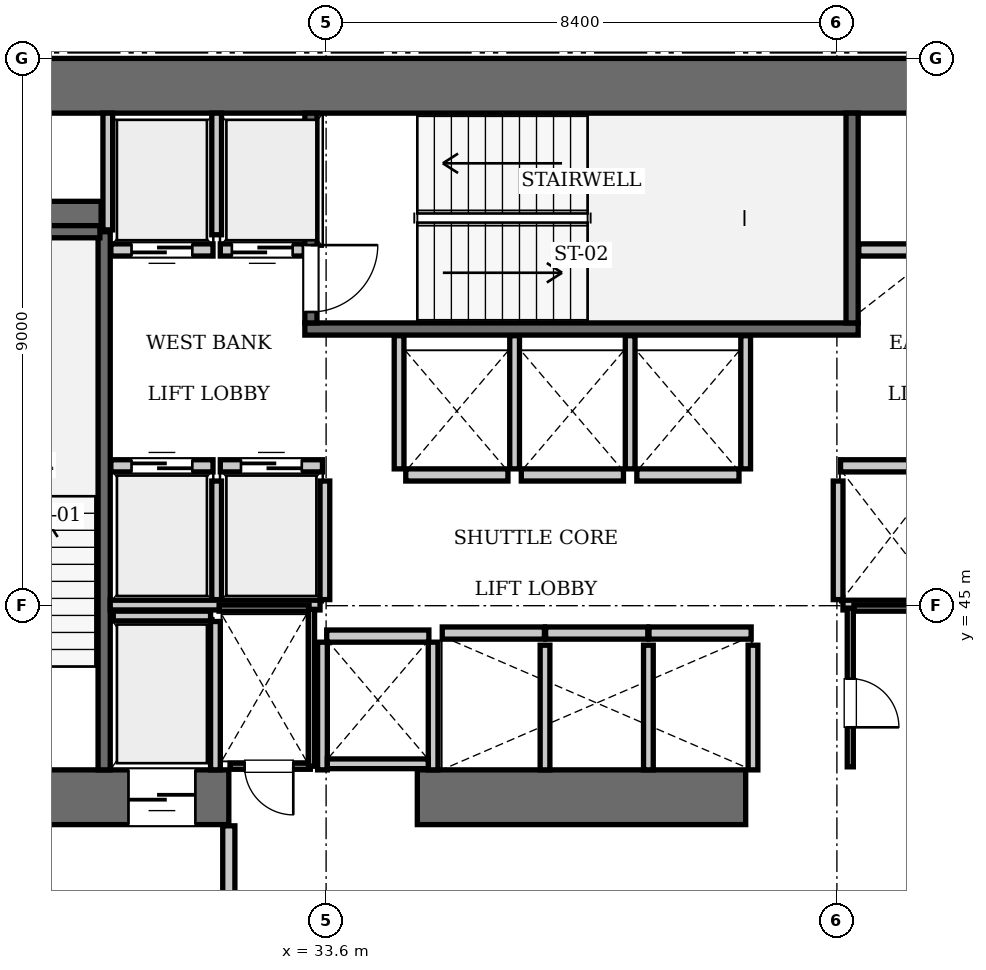
"""IFC4 building model, lengths in metres.
Left out: names, types, materials, properties, quantities, classifications, styles, units other than length and angle.
Written with IfcOpenShell. Run it as: python <this file> out.ifc"""

import sys

from ifc_helpers import new_model, si_unit, direction, frame, frame_2d, origin, place, context, subcontext, project, spatial, rectangle, extrude, element, fill, save


model = new_model("IFC4")
c1 = context("Model", 3, precision=1e-05, world=origin(), true_north=direction((0.0, 1.0)))
c2 = subcontext(c1, "Body", "Model", "MODEL_VIEW")
j1 = project(units=[si_unit("LENGTHUNIT", "METRE"), si_unit("PLANEANGLEUNIT", "RADIAN")], contexts=[c1])
p1 = place(None, origin())
s1 = spatial("IfcSite", under=j1, at=p1, CompositionType="ELEMENT")
p2 = place(p1, origin())
s2 = spatial("IfcBuilding", under=s1, at=p2, CompositionType="ELEMENT")
p3 = place(p2, frame((0.0, 0.0, 46.2)))
s3 = spatial("IfcBuildingStorey", under=s2, at=p3, CompositionType="ELEMENT", Elevation=46.2)
p4 = place(p3, frame((25.2, 53.55, 0.0), z_axis=(0.0, 0.0, 1.0), x_axis=(1.0, 0.0, 0.0)))
e1 = element("IfcWall", 1, at=p4, inside=s3, PredefinedType="SHEAR", context=c2, shape_type="SweptSolid", body=[
    extrude(rectangle(XDim=25.2, YDim=0.9, at=frame_2d((12.6, 0.0))), origin(), (0.0, 0.0, 1.0), 3.85),
])
p5 = place(p3, frame((25.2, 41.85, 0.0), z_axis=(0.0, 0.0, 1.0), x_axis=(1.0, 0.0, 0.0)))
e2 = element("IfcWall", 2, at=p5, inside=s3, PredefinedType="SHEAR", context=c2, shape_type="SweptSolid", body=[
    extrude(rectangle(XDim=6.8, YDim=0.9, at=frame_2d((3.4, 0.0))), origin(), (0.0, 0.0, 1.0), 3.85),
])
p6 = place(p5, frame((1.65, 0.0, 0.0)))
e3 = element("IfcOpeningElement", 3, at=p6, cuts=e2, PredefinedType="OPENING", context=c2, shape_type="SweptSolid", body=[
    extrude(rectangle(XDim=1.15, YDim=2.15, at=frame_2d((0.575, 1.075))), frame((0.0, 0.46, 0.0), z_axis=(0.0, -1.0, 0.0), x_axis=(1.0, 0.0, 0.0)), (0.0, 0.0, 1.0), 0.92),
])
p7 = place(p5, frame((5.15, 0.0, 0.0)))
e4 = element("IfcOpeningElement", 4, at=p7, cuts=e2, PredefinedType="OPENING", context=c2, shape_type="SweptSolid", body=[
    extrude(rectangle(XDim=1.1, YDim=2.2, at=frame_2d((0.55, 1.1))), frame((0.0, 0.46, 0.0), z_axis=(0.0, -1.0, 0.0), x_axis=(1.0, 0.0, 0.0)), (0.0, 0.0, 1.0), 0.92),
])
p8 = place(p3, frame((35.1, 41.85, 0.0), z_axis=(0.0, 0.0, 1.0), x_axis=(1.0, 0.0, 0.0)))
e5 = element("IfcWall", 5, at=p8, inside=s3, PredefinedType="SHEAR", context=c2, shape_type="SweptSolid", body=[
    extrude(rectangle(XDim=5.4, YDim=0.9, at=frame_2d((2.7, 0.0))), origin(), (0.0, 0.0, 1.0), 3.85),
])
p9 = place(p3, frame((26.1, 51.4, 0.0), z_axis=(0.0, 0.0, 1.0), x_axis=(1.0, 0.0, 0.0)))
e6 = element("IfcWall", 6, at=p9, inside=s3, PredefinedType="SHEAR", context=c2, shape_type="SweptSolid", body=[
    extrude(rectangle(XDim=3.8, YDim=0.5, at=frame_2d((1.9, 0.0))), origin(), (0.0, 0.0, 1.0), 3.85),
])
p10 = place(p3, frame((29.95, 42.3, 0.0), z_axis=(0.0, 0.0, 1.0), x_axis=(0.0, 1.0, 0.0)))
e7 = element("IfcWall", 7, at=p10, inside=s3, PredefinedType="SOLIDWALL", context=c2, shape_type="SweptSolid", body=[
    extrude(rectangle(XDim=8.85, YDim=0.2, at=frame_2d((4.425, 0.0))), origin(), (0.0, 0.0, 1.0), 3.61),
])
p11 = place(p3, frame((26.38, 51.15, 0.0), z_axis=(0.0, 0.0, 1.0), x_axis=(1.0, 0.0, 0.0)))
e8 = element("IfcWall", 8, at=p11, inside=s3, PredefinedType="SOLIDWALL", context=c2, shape_type="SweptSolid", body=[
    extrude(rectangle(XDim=3.5, YDim=0.2, at=frame_2d((1.75, 0.0))), origin(), (0.0, 0.0, 1.0), 3.61),
])
p12 = place(p3, frame((33.25, 49.55, 0.0), z_axis=(0.0, 0.0, 1.0), x_axis=(1.0, 0.0, 0.0)))
e9 = element("IfcWall", 9, at=p12, inside=s3, PredefinedType="SOLIDWALL", context=c2, shape_type="SweptSolid", body=[
    extrude(rectangle(XDim=9.1, YDim=0.2, at=frame_2d((4.55, 0.0))), origin(), (0.0, 0.0, 1.0), 3.61),
])
p13 = place(p3, frame((42.25, 49.65, 0.0), z_axis=(0.0, 0.0, 1.0), x_axis=(0.0, 1.0, 0.0)))
e10 = element("IfcWall", 10, at=p13, inside=s3, PredefinedType="SOLIDWALL", context=c2, shape_type="SweptSolid", body=[
    extrude(rectangle(XDim=3.45, YDim=0.2, at=frame_2d((1.725, 0.0))), origin(), (0.0, 0.0, 1.0), 3.61),
])
p14 = place(p3, frame((33.35, 49.65, 0.0), z_axis=(0.0, 0.0, 1.0), x_axis=(0.0, 1.0, 0.0)))
e11 = element("IfcWall", 11, at=p14, inside=s3, PredefinedType="SOLIDWALL", context=c2, shape_type="SweptSolid", body=[
    extrude(rectangle(XDim=3.45, YDim=0.2, at=frame_2d((1.725, 0.0))), origin(), (0.0, 0.0, 1.0), 3.61),
])
p15 = place(p14, frame((0.18, 0.0, 0.0)))
e12 = element("IfcOpeningElement", 12, at=p15, cuts=e11, PredefinedType="OPENING", context=c2, shape_type="SweptSolid", body=[
    extrude(rectangle(XDim=1.1, YDim=2.15, at=frame_2d((0.55, 1.075))), frame((0.0, 0.11, 0.0), z_axis=(0.0, -1.0, 0.0), x_axis=(1.0, 0.0, 0.0)), (0.0, 0.0, 1.0), 0.22),
])
p16 = place(p3, frame((30.06, 47.3, 0.0), z_axis=(0.0, 0.0, 1.0), x_axis=(1.0, 0.0, 0.0)))
e13 = element("IfcWall", 13, at=p16, inside=s3, PredefinedType="SOLIDWALL", context=c2, shape_type="SweptSolid", body=[
    extrude(rectangle(XDim=1.68, YDim=0.2, at=frame_2d((0.84, 0.0))), origin(), (0.0, 0.0, 1.0), 3.61),
])
p17 = place(p16, frame((0.34, 0.0, 0.0)))
e14 = element("IfcOpeningElement", 14, at=p17, cuts=e13, PredefinedType="OPENING", context=c2, shape_type="SweptSolid", body=[
    extrude(rectangle(XDim=1.0, YDim=2.15, at=frame_2d((0.5, 1.075))), frame((0.0, 0.11, 0.0), z_axis=(0.0, -1.0, 0.0), x_axis=(1.0, 0.0, 0.0)), (0.0, 0.0, 1.0), 0.22),
])
p18 = place(p3, frame((31.86, 47.3, 0.0), z_axis=(0.0, 0.0, 1.0), x_axis=(1.0, 0.0, 0.0)))
e15 = element("IfcWall", 15, at=p18, inside=s3, PredefinedType="SOLIDWALL", context=c2, shape_type="SweptSolid", body=[
    extrude(rectangle(XDim=1.68, YDim=0.2, at=frame_2d((0.84, 0.0))), origin(), (0.0, 0.0, 1.0), 3.61),
])
p19 = place(p18, frame((0.34, 0.0, 0.0)))
e16 = element("IfcOpeningElement", 16, at=p19, cuts=e15, PredefinedType="OPENING", context=c2, shape_type="SweptSolid", body=[
    extrude(rectangle(XDim=1.0, YDim=2.15, at=frame_2d((0.5, 1.075))), frame((0.0, 0.11, 0.0), z_axis=(0.0, -1.0, 0.0), x_axis=(1.0, 0.0, 0.0)), (0.0, 0.0, 1.0), 0.22),
])
p20 = place(p3, frame((30.06, 50.85, 0.0), z_axis=(0.0, 0.0, 1.0), x_axis=(1.0, 0.0, 0.0)))
e17 = element("IfcWall", 17, at=p20, inside=s3, PredefinedType="SOLIDWALL", context=c2, shape_type="SweptSolid", body=[
    extrude(rectangle(XDim=1.68, YDim=0.2, at=frame_2d((0.84, 0.0))), origin(), (0.0, 0.0, 1.0), 3.61),
])
p21 = place(p20, frame((0.34, 0.0, 0.0)))
e18 = element("IfcOpeningElement", 18, at=p21, cuts=e17, PredefinedType="OPENING", context=c2, shape_type="SweptSolid", body=[
    extrude(rectangle(XDim=1.0, YDim=2.15, at=frame_2d((0.5, 1.075))), frame((0.0, 0.11, 0.0), z_axis=(0.0, -1.0, 0.0), x_axis=(1.0, 0.0, 0.0)), (0.0, 0.0, 1.0), 0.22),
])
p22 = place(p3, frame((31.86, 50.85, 0.0), z_axis=(0.0, 0.0, 1.0), x_axis=(1.0, 0.0, 0.0)))
e19 = element("IfcWall", 19, at=p22, inside=s3, PredefinedType="SOLIDWALL", context=c2, shape_type="SweptSolid", body=[
    extrude(rectangle(XDim=1.38, YDim=0.2, at=frame_2d((0.69, 0.0))), origin(), (0.0, 0.0, 1.0), 3.61),
])
p23 = place(p22, frame((0.19, 0.0, 0.0)))
e20 = element("IfcOpeningElement", 20, at=p23, cuts=e19, PredefinedType="OPENING", context=c2, shape_type="SweptSolid", body=[
    extrude(rectangle(XDim=1.0, YDim=2.15, at=frame_2d((0.5, 1.075))), frame((0.0, 0.11, 0.0), z_axis=(0.0, -1.0, 0.0), x_axis=(1.0, 0.0, 0.0)), (0.0, 0.0, 1.0), 0.22),
])
p24 = place(p3, frame((42.06, 47.3, 0.0), z_axis=(0.0, 0.0, 1.0), x_axis=(1.0, 0.0, 0.0)))
e21 = element("IfcWall", 21, at=p24, inside=s3, PredefinedType="SOLIDWALL", context=c2, shape_type="SweptSolid", body=[
    extrude(rectangle(XDim=1.68, YDim=0.2, at=frame_2d((0.84, 0.0))), origin(), (0.0, 0.0, 1.0), 3.61),
])
p25 = place(p3, frame((42.36, 50.85, 0.0), z_axis=(0.0, 0.0, 1.0), x_axis=(1.0, 0.0, 0.0)))
e22 = element("IfcWall", 22, at=p25, inside=s3, PredefinedType="SOLIDWALL", context=c2, shape_type="SweptSolid", body=[
    extrude(rectangle(XDim=1.38, YDim=0.2, at=frame_2d((0.69, 0.0))), origin(), (0.0, 0.0, 1.0), 3.61),
])
for number, where, z_axis, x_axis in (
    (23, (35.51, 44.55, 0.0), (0.0, 0.0, 1.0), (1.0, 0.0, 0.0)),
    (24, (37.21, 44.55, 0.0), (0.0, 0.0, 1.0), (1.0, 0.0, 0.0)),
):
    element("IfcWall", number, at=place(p3, frame(where, z_axis=z_axis, x_axis=x_axis)), inside=s3, PredefinedType="SOLIDWALL", context=c2, shape_type="SweptSolid", body=[
        extrude(rectangle(XDim=1.68, YDim=0.2, at=frame_2d((0.84, 0.0))), origin(), (0.0, 0.0, 1.0), 3.61),
    ])
for number, where, z_axis, x_axis in (
    (25, (38.91, 44.55, 0.0), (0.0, 0.0, 1.0), (1.0, 0.0, 0.0)),
    (26, (34.91, 47.15, 0.0), (0.0, 0.0, 1.0), (1.0, 0.0, 0.0)),
):
    element("IfcWall", number, at=place(p3, frame(where, z_axis=z_axis, x_axis=x_axis)), inside=s3, PredefinedType="SOLIDWALL", context=c2, shape_type="SweptSolid", body=[
        extrude(rectangle(XDim=1.68, YDim=0.2, at=frame_2d((0.84, 0.0))), origin(), (0.0, 0.0, 1.0), 3.61),
    ])
for number, where, z_axis, x_axis in (
    (27, (36.81, 47.15, 0.0), (0.0, 0.0, 1.0), (1.0, 0.0, 0.0)),
    (28, (38.71, 47.15, 0.0), (0.0, 0.0, 1.0), (1.0, 0.0, 0.0)),
    (29, (33.61, 44.5, 0.0), (0.0, 0.0, 1.0), (1.0, 0.0, 0.0)),
):
    element("IfcWall", number, at=place(p3, frame(where, z_axis=z_axis, x_axis=x_axis)), inside=s3, PredefinedType="SOLIDWALL", context=c2, shape_type="SweptSolid", body=[
        extrude(rectangle(XDim=1.68, YDim=0.2, at=frame_2d((0.84, 0.0))), origin(), (0.0, 0.0, 1.0), 3.61),
    ])
p26 = place(p3, frame((30.1, 44.83, 0.0), z_axis=(0.0, 0.0, 1.0), x_axis=(1.0, 0.0, 0.0)))
e30 = element("IfcWall", 30, at=p26, inside=s3, PredefinedType="SOLIDWALL", context=c2, shape_type="SweptSolid", body=[
    extrude(rectangle(XDim=1.6, YDim=0.16, at=frame_2d((0.8, 0.0))), origin(), (0.0, 0.0, 1.0), 3.61),
])
p27 = place(p3, frame((31.78, 42.3, 0.0), z_axis=(0.0, 0.0, 1.0), x_axis=(0.0, 1.0, 0.0)))
e31 = element("IfcWall", 31, at=p27, inside=s3, PredefinedType="SOLIDWALL", context=c2, shape_type="SweptSolid", body=[
    extrude(rectangle(XDim=2.44, YDim=0.16, at=frame_2d((1.22, 0.0))), origin(), (0.0, 0.0, 1.0), 3.61),
])
for number, where, z_axis, x_axis in (
    (32, (31.8, 45.1, 0.0), (0.0, 0.0, 1.0), (0.0, 1.0, 0.0)),
    (33, (33.58, 45.1, 0.0), (0.0, 0.0, 1.0), (0.0, 1.0, 0.0)),
):
    element("IfcWall", number, at=place(p3, frame(where, z_axis=z_axis, x_axis=x_axis)), inside=s3, PredefinedType="SOLIDWALL", context=c2, shape_type="SweptSolid", body=[
        extrude(rectangle(XDim=1.95, YDim=0.16, at=frame_2d((0.975, 0.0))), origin(), (0.0, 0.0, 1.0), 3.61),
    ])
p28 = place(p3, frame((30.05, 45.01, 0.0), z_axis=(0.0, 0.0, 1.0), x_axis=(1.0, 0.0, 0.0)))
e34 = element("IfcWall", 34, at=p28, inside=s3, PredefinedType="SOLIDWALL", context=c2, shape_type="SweptSolid", body=[
    extrude(rectangle(XDim=3.45, YDim=0.16, at=frame_2d((1.725, 0.0))), origin(), (0.0, 0.0, 1.0), 3.61),
])
p29 = place(p3, frame((30.01, 51.18, 0.0), z_axis=(0.0, 0.0, 1.0), x_axis=(0.0, 1.0, 0.0)))
e35 = element("IfcWall", 35, at=p29, inside=s3, PredefinedType="SOLIDWALL", context=c2, shape_type="SweptSolid", body=[
    extrude(rectangle(XDim=1.92, YDim=0.16, at=frame_2d((0.96, 0.0))), origin(), (0.0, 0.0, 1.0), 3.61),
])
p30 = place(p3, frame((31.8, 51.1, 0.0), z_axis=(0.0, 0.0, 1.0), x_axis=(0.0, 1.0, 0.0)))
e36 = element("IfcWall", 36, at=p30, inside=s3, PredefinedType="SOLIDWALL", context=c2, shape_type="SweptSolid", body=[
    extrude(rectangle(XDim=2.0, YDim=0.16, at=frame_2d((1.0, 0.0))), origin(), (0.0, 0.0, 1.0), 3.61),
])
p31 = place(p3, frame((42.02, 45.1, 0.0), z_axis=(0.0, 0.0, 1.0), x_axis=(0.0, 1.0, 0.0)))
e37 = element("IfcWall", 37, at=p31, inside=s3, PredefinedType="SOLIDWALL", context=c2, shape_type="SweptSolid", body=[
    extrude(rectangle(XDim=1.95, YDim=0.16, at=frame_2d((0.975, 0.0))), origin(), (0.0, 0.0, 1.0), 3.61),
])
p32 = place(p3, frame((42.1, 45.01, 0.0), z_axis=(0.0, 0.0, 1.0), x_axis=(1.0, 0.0, 0.0)))
e38 = element("IfcWall", 38, at=p32, inside=s3, PredefinedType="SOLIDWALL", context=c2, shape_type="SweptSolid", body=[
    extrude(rectangle(XDim=3.45, YDim=0.16, at=frame_2d((1.725, 0.0))), origin(), (0.0, 0.0, 1.0), 3.61),
])
for number, where, z_axis, x_axis in (
    (39, (37.2, 42.3, 0.0), (0.0, 0.0, 1.0), (0.0, 1.0, 0.0)),
    (40, (38.9, 42.3, 0.0), (0.0, 0.0, 1.0), (0.0, 1.0, 0.0)),
    (41, (40.62, 42.3, 0.0), (0.0, 0.0, 1.0), (0.0, 1.0, 0.0)),
):
    element("IfcWall", number, at=place(p3, frame(where, z_axis=z_axis, x_axis=x_axis)), inside=s3, PredefinedType="SOLIDWALL", context=c2, shape_type="SweptSolid", body=[
        extrude(rectangle(XDim=2.05, YDim=0.16, at=frame_2d((1.025, 0.0))), origin(), (0.0, 0.0, 1.0), 3.61),
    ])
for number, where, z_axis, x_axis in (
    (42, (34.8, 47.25, 0.0), (0.0, 0.0, 1.0), (0.0, 1.0, 0.0)),
    (43, (36.7, 47.25, 0.0), (0.0, 0.0, 1.0), (0.0, 1.0, 0.0)),
    (44, (38.6, 47.25, 0.0), (0.0, 0.0, 1.0), (0.0, 1.0, 0.0)),
    (45, (40.5, 47.25, 0.0), (0.0, 0.0, 1.0), (0.0, 1.0, 0.0)),
):
    element("IfcWall", number, at=place(p3, frame(where, z_axis=z_axis, x_axis=x_axis)), inside=s3, PredefinedType="SOLIDWALL", context=c2, shape_type="SweptSolid", body=[
        extrude(rectangle(XDim=2.19, YDim=0.16, at=frame_2d((1.095, 0.0))), origin(), (0.0, 0.0, 1.0), 3.61),
    ])
for number, where, z_axis, x_axis in (
    (46, (33.54, 42.3, 0.0), (0.0, 0.0, 1.0), (0.0, 1.0, 0.0)),
    (47, (35.36, 42.3, 0.0), (0.0, 0.0, 1.0), (0.0, 1.0, 0.0)),
):
    element("IfcWall", number, at=place(p3, frame(where, z_axis=z_axis, x_axis=x_axis)), inside=s3, PredefinedType="SOLIDWALL", context=c2, shape_type="SweptSolid", body=[
        extrude(rectangle(XDim=2.1, YDim=0.16, at=frame_2d((1.05, 0.0))), origin(), (0.0, 0.0, 1.0), 3.61),
    ])
p33 = place(p3, frame((33.62, 42.4, 0.0), z_axis=(0.0, 0.0, 1.0), x_axis=(1.0, 0.0, 0.0)))
e48 = element("IfcWall", 48, at=p33, inside=s3, PredefinedType="SOLIDWALL", context=c2, shape_type="SweptSolid", body=[
    extrude(rectangle(XDim=1.66, YDim=0.16, at=frame_2d((0.83, 0.0))), origin(), (0.0, 0.0, 1.0), 3.61),
])
p34 = place(p3, frame((32.0, 38.31, 0.0), z_axis=(0.0, 0.0, 1.0), x_axis=(0.0, 1.0, 0.0)))
e49 = element("IfcWall", 49, at=p34, inside=s3, PredefinedType="PARTITIONING", context=c2, shape_type="SweptSolid", body=[
    extrude(rectangle(XDim=3.07, YDim=0.2, at=frame_2d((1.535, 0.0))), origin(), (0.0, 0.0, 1.0), 3.61),
])
p35 = place(p3, frame((32.02, 42.36, 0.0), z_axis=(0.0, 0.0, 1.0), x_axis=(1.0, 0.0, 0.0)))
e50 = element("IfcWall", 50, at=p35, inside=s3, PredefinedType="PARTITIONING", context=c2, shape_type="SweptSolid", body=[
    extrude(rectangle(XDim=1.32, YDim=0.1, at=frame_2d((0.66, 0.0))), origin(), (0.0, 0.0, 1.0), 3.61),
])
p36 = place(p35, frame((0.24, 0.0, 0.0)))
e51 = element("IfcOpeningElement", 51, at=p36, cuts=e50, PredefinedType="OPENING", context=c2, shape_type="SweptSolid", body=[
    extrude(rectangle(XDim=0.8, YDim=2.05, at=frame_2d((0.4, 1.025))), frame((0.0, 0.06, 0.0), z_axis=(0.0, -1.0, 0.0), x_axis=(1.0, 0.0, 0.0)), (0.0, 0.0, 1.0), 0.12),
])
p37 = place(p3, frame((31.84, 44.96, 0.0), z_axis=(0.0, 0.0, 1.0), x_axis=(1.0, 0.0, 0.0)))
e52 = element("IfcWall", 52, at=p37, inside=s3, PredefinedType="PARTITIONING", context=c2, shape_type="SweptSolid", body=[
    extrude(rectangle(XDim=1.48, YDim=0.1, at=frame_2d((0.74, 0.0))), origin(), (0.0, 0.0, 1.0), 3.61),
])
p38 = place(p3, frame((33.36, 42.36, 0.0), z_axis=(0.0, 0.0, 1.0), x_axis=(0.0, 1.0, 0.0)))
e53 = element("IfcWall", 53, at=p38, inside=s3, PredefinedType="PARTITIONING", context=c2, shape_type="SweptSolid", body=[
    extrude(rectangle(XDim=2.58, YDim=0.1, at=frame_2d((1.29, 0.0))), origin(), (0.0, 0.0, 1.0), 3.61),
])
p39 = place(p3, frame((42.22, 42.35, 0.0), z_axis=(0.0, 0.0, 1.0), x_axis=(0.0, 1.0, 0.0)))
e54 = element("IfcWall", 54, at=p39, inside=s3, PredefinedType="PARTITIONING", context=c2, shape_type="SweptSolid", body=[
    extrude(rectangle(XDim=2.61, YDim=0.1, at=frame_2d((1.305, 0.0))), origin(), (0.0, 0.0, 1.0), 3.61),
])
p40 = place(p39, frame((0.65, 0.0, 0.0)))
e55 = element("IfcOpeningElement", 55, at=p40, cuts=e54, PredefinedType="OPENING", context=c2, shape_type="SweptSolid", body=[
    extrude(rectangle(XDim=0.8, YDim=2.05, at=frame_2d((0.4, 1.025))), frame((0.0, 0.06, 0.0), z_axis=(0.0, -1.0, 0.0), x_axis=(1.0, 0.0, 0.0)), (0.0, 0.0, 1.0), 0.12),
])
p41 = place(p3, frame((42.28, 44.96, 0.0), z_axis=(0.0, 0.0, 1.0), x_axis=(1.0, 0.0, 0.0)))
e56 = element("IfcWall", 56, at=p41, inside=s3, PredefinedType="PARTITIONING", context=c2, shape_type="SweptSolid", body=[
    extrude(rectangle(XDim=1.3, YDim=0.1, at=frame_2d((0.65, 0.0))), origin(), (0.0, 0.0, 1.0), 3.61),
])
p42 = place(p15, frame((1.1, 0.0, 0.0), z_axis=(0.0, 0.0, 1.0), x_axis=(-1.0, 0.0, 0.0)))
e57 = element("IfcDoor", 57, at=p42, inside=s3, OperationType="SINGLE_SWING_LEFT", PredefinedType="DOOR", context=c2, shape_type="SweptSolid", body=[
    extrude(rectangle(XDim=1.1, YDim=2.15, at=frame_2d((0.55, 1.075))), frame((0.0, 0.025, 0.0), z_axis=(0.0, -1.0, 0.0), x_axis=(1.0, 0.0, 0.0)), (0.0, 0.0, 1.0), 0.05),
])
fill(e12, e57)
p43 = place(p17, origin())
e58 = element("IfcDoor", 58, at=p43, inside=s3, OperationType="SLIDING_TO_LEFT", PredefinedType="DOOR", context=c2, shape_type="SweptSolid", body=[
    extrude(rectangle(XDim=1.0, YDim=2.15, at=frame_2d((0.5, 1.075))), frame((0.0, 0.025, 0.0), z_axis=(0.0, -1.0, 0.0), x_axis=(1.0, 0.0, 0.0)), (0.0, 0.0, 1.0), 0.05),
])
fill(e14, e58)
p44 = place(p19, origin())
e59 = element("IfcDoor", 59, at=p44, inside=s3, OperationType="SLIDING_TO_LEFT", PredefinedType="DOOR", context=c2, shape_type="SweptSolid", body=[
    extrude(rectangle(XDim=1.0, YDim=2.15, at=frame_2d((0.5, 1.075))), frame((0.0, 0.025, 0.0), z_axis=(0.0, -1.0, 0.0), x_axis=(1.0, 0.0, 0.0)), (0.0, 0.0, 1.0), 0.05),
])
fill(e16, e59)
p45 = place(p21, frame((1.0, 0.0, 0.0), z_axis=(0.0, 0.0, 1.0), x_axis=(-1.0, 0.0, 0.0)))
e60 = element("IfcDoor", 60, at=p45, inside=s3, OperationType="SLIDING_TO_LEFT", PredefinedType="DOOR", context=c2, shape_type="SweptSolid", body=[
    extrude(rectangle(XDim=1.0, YDim=2.15, at=frame_2d((0.5, 1.075))), frame((0.0, 0.025, 0.0), z_axis=(0.0, -1.0, 0.0), x_axis=(1.0, 0.0, 0.0)), (0.0, 0.0, 1.0), 0.05),
])
fill(e18, e60)
p46 = place(p23, frame((1.0, 0.0, 0.0), z_axis=(0.0, 0.0, 1.0), x_axis=(-1.0, 0.0, 0.0)))
e61 = element("IfcDoor", 61, at=p46, inside=s3, OperationType="SLIDING_TO_LEFT", PredefinedType="DOOR", context=c2, shape_type="SweptSolid", body=[
    extrude(rectangle(XDim=1.0, YDim=2.15, at=frame_2d((0.5, 1.075))), frame((0.0, 0.025, 0.0), z_axis=(0.0, -1.0, 0.0), x_axis=(1.0, 0.0, 0.0)), (0.0, 0.0, 1.0), 0.05),
])
fill(e20, e61)
p47 = place(p7, frame((1.1, 0.0, 0.0), z_axis=(0.0, 0.0, 1.0), x_axis=(-1.0, 0.0, 0.0)))
e62 = element("IfcDoor", 62, at=p47, inside=s3, OperationType="SLIDING_TO_LEFT", PredefinedType="DOOR", context=c2, shape_type="SweptSolid", body=[
    extrude(rectangle(XDim=1.1, YDim=2.2, at=frame_2d((0.55, 1.1))), frame((0.0, 0.025, 0.0), z_axis=(0.0, -1.0, 0.0), x_axis=(1.0, 0.0, 0.0)), (0.0, 0.0, 1.0), 0.05),
])
fill(e4, e62)
p48 = place(p36, frame((0.8, 0.0, 0.0), z_axis=(0.0, 0.0, 1.0), x_axis=(-1.0, 0.0, 0.0)))
e63 = element("IfcDoor", 63, at=p48, inside=s3, OperationType="SINGLE_SWING_LEFT", PredefinedType="DOOR", context=c2, shape_type="SweptSolid", body=[
    extrude(rectangle(XDim=0.8, YDim=2.05, at=frame_2d((0.4, 1.025))), frame((0.0, 0.025, 0.0), z_axis=(0.0, -1.0, 0.0), x_axis=(1.0, 0.0, 0.0)), (0.0, 0.0, 1.0), 0.05),
])
fill(e51, e63)
p49 = place(p40, frame((0.8, 0.0, 0.0), z_axis=(0.0, 0.0, 1.0), x_axis=(-1.0, 0.0, 0.0)))
e64 = element("IfcDoor", 64, at=p49, inside=s3, OperationType="SINGLE_SWING_RIGHT", PredefinedType="DOOR", context=c2, shape_type="SweptSolid", body=[
    extrude(rectangle(XDim=0.8, YDim=2.05, at=frame_2d((0.4, 1.025))), frame((0.0, 0.025, 0.0), z_axis=(0.0, -1.0, 0.0), x_axis=(1.0, 0.0, 0.0)), (0.0, 0.0, 1.0), 0.05),
])
fill(e55, e64)
save(model, sys.argv[1])
